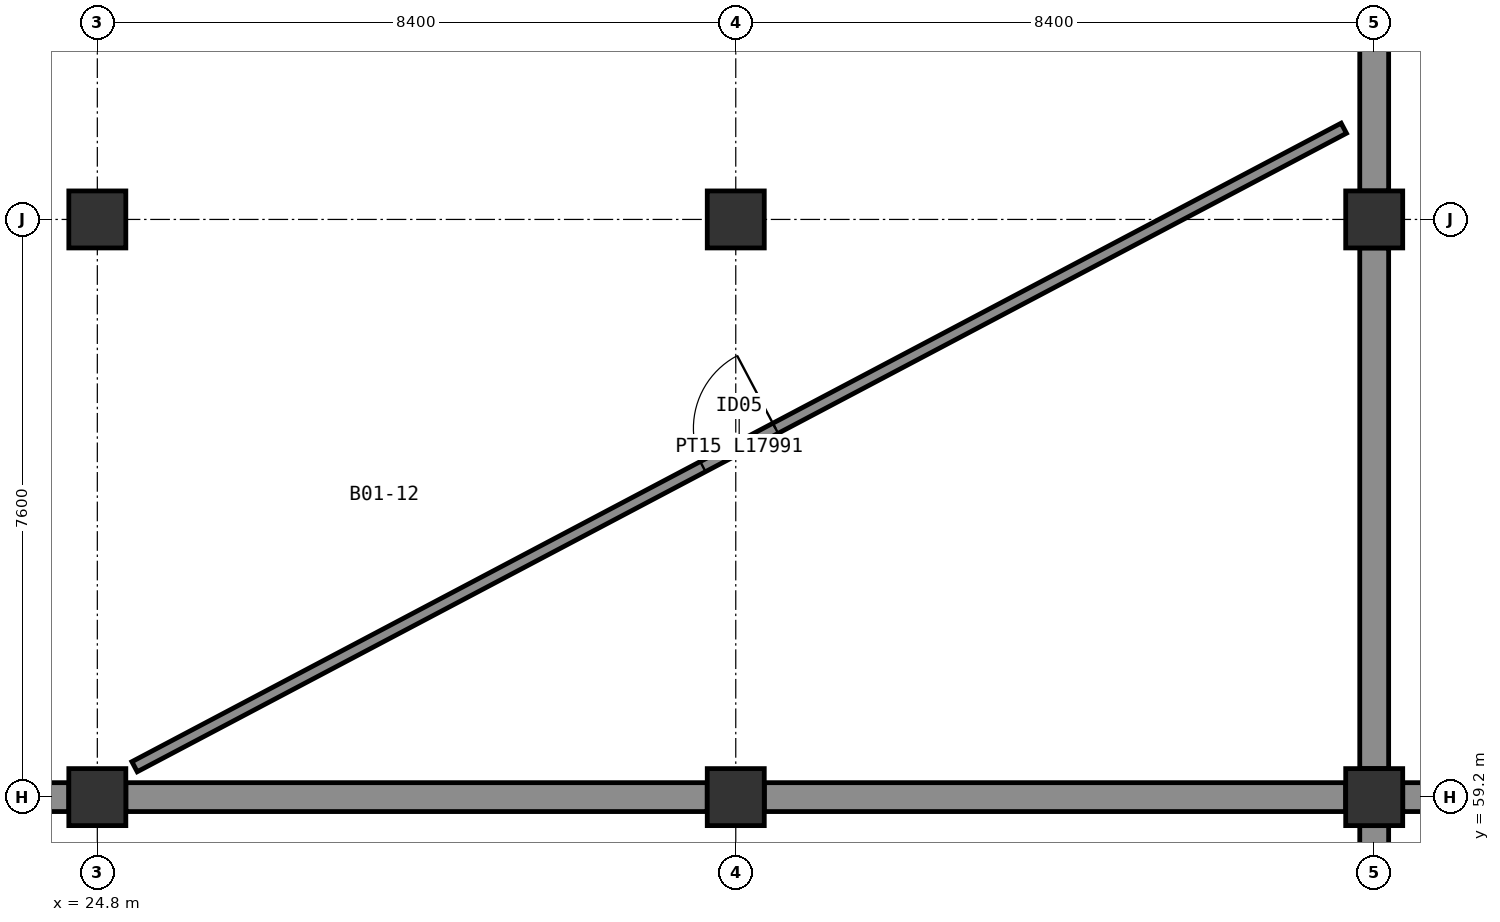
"""IFC4 building model, lengths in metres.
Left out: names, types, materials, properties, quantities, classifications, styles, units other than length and angle.
Written with IfcOpenShell. Run it as: python <this file> out.ifc"""

import sys

from ifc_helpers import new_model, si_unit, direction, frame, frame_2d, origin, origin_2d, place, context, subcontext, project, spatial, rectangle, extrude, element, fill, save


model = new_model("IFC4")
c1 = context("Model", 3, precision=1e-05, world=origin(), true_north=direction((0.0, 1.0)))
c2 = subcontext(c1, "Body", "Model", "MODEL_VIEW")
j1 = project(units=[si_unit("LENGTHUNIT", "METRE"), si_unit("PLANEANGLEUNIT", "RADIAN")], contexts=[c1])
p1 = place(None, origin())
s1 = spatial("IfcSite", under=j1, at=p1, CompositionType="ELEMENT")
p2 = place(p1, origin())
s2 = spatial("IfcBuilding", under=s1, at=p2, CompositionType="ELEMENT")
p3 = place(p2, frame((0.0, 0.0, -4.5)))
s3 = spatial("IfcBuildingStorey", under=s2, at=p3, CompositionType="ELEMENT", Elevation=-4.5)
for number, where, z_axis, x_axis in (
    (1, (24.8, 59.2, -0.4), (0.0, 0.0, 1.0), (1.0, 0.0, 0.0)),
    (2, (33.2, 59.2, -0.4), (0.0, 0.0, 1.0), (1.0, 0.0, 0.0)),
    (3, (41.6, 59.2, -0.4), (0.0, 0.0, 1.0), (1.0, 0.0, 0.0)),
    (4, (24.8, 66.8, -0.4), (0.0, 0.0, 1.0), (1.0, 0.0, 0.0)),
    (5, (33.2, 66.8, -0.4), (0.0, 0.0, 1.0), (1.0, 0.0, 0.0)),
    (6, (41.6, 66.8, -0.4), (0.0, 0.0, 1.0), (1.0, 0.0, 0.0)),
):
    element("IfcColumn", number, at=place(p3, frame(where, z_axis=z_axis, x_axis=x_axis)), inside=s3, PredefinedType="COLUMN", context=c2, shape_type="SweptSolid", body=[
        extrude(rectangle(XDim=0.75, YDim=0.75, at=origin_2d()), origin(), (0.0, 0.0, 1.0), 4.9),
    ])
p4 = place(p3, frame((49.625, 59.2, 0.0), z_axis=(0.0, 0.0, 1.0), x_axis=(-1.0, 0.0, 0.0)))
e7 = element("IfcWall", 7, at=p4, inside=s3, PredefinedType="SOLIDWALL", context=c2, shape_type="SweptSolid", body=[
    extrude(rectangle(XDim=7.65, YDim=0.38, at=frame_2d((3.825, 0.0))), origin(), (0.0, 0.0, 1.0), 3.847),
])
p5 = place(p3, frame((41.6, 59.575, 0.0), z_axis=(0.0, 0.0, 1.0), x_axis=(0.0, 1.0, 0.0)))
e8 = element("IfcWall", 8, at=p5, inside=s3, PredefinedType="SOLIDWALL", context=c2, shape_type="SweptSolid", body=[
    extrude(rectangle(XDim=6.85, YDim=0.38, at=frame_2d((3.425, 0.0))), origin(), (0.0, 0.0, 1.0), 3.61),
])
p6 = place(p3, frame((41.6, 67.175, 0.0), z_axis=(0.0, 0.0, 1.0), x_axis=(0.0, 1.0, 0.0)))
e9 = element("IfcWall", 9, at=p6, inside=s3, PredefinedType="SOLIDWALL", context=c2, shape_type="SweptSolid", body=[
    extrude(rectangle(XDim=6.85, YDim=0.38, at=frame_2d((3.425, 0.0))), origin(), (0.0, 0.0, 1.0), 3.61),
])
p7 = place(p3, frame((16.775, 59.2, 0.0), z_axis=(0.0, 0.0, 1.0), x_axis=(1.0, 0.0, 0.0)))
e10 = element("IfcWall", 10, at=p7, inside=s3, PredefinedType="SOLIDWALL", context=c2, shape_type="SweptSolid", body=[
    extrude(rectangle(XDim=7.65, YDim=0.38, at=frame_2d((3.825, 0.0))), origin(), (0.0, 0.0, 1.0), 3.847),
])
p8 = place(p3, frame((25.175, 59.2, 0.0), z_axis=(0.0, 0.0, 1.0), x_axis=(1.0, 0.0, 0.0)))
e11 = element("IfcWall", 11, at=p8, inside=s3, PredefinedType="SOLIDWALL", context=c2, shape_type="SweptSolid", body=[
    extrude(rectangle(XDim=7.65, YDim=0.38, at=frame_2d((3.825, 0.0))), origin(), (0.0, 0.0, 1.0), 3.847),
])
p9 = place(p3, frame((33.575, 59.2, 0.0), z_axis=(0.0, 0.0, 1.0), x_axis=(1.0, 0.0, 0.0)))
e12 = element("IfcWall", 12, at=p9, inside=s3, PredefinedType="SOLIDWALL", context=c2, shape_type="SweptSolid", body=[
    extrude(rectangle(XDim=7.65, YDim=0.38, at=frame_2d((3.825, 0.0))), origin(), (0.0, 0.0, 1.0), 3.61),
])
p10 = place(p3, frame((41.6, 58.825, 0.0), z_axis=(0.0, 0.0, 1.0), x_axis=(0.0, -1.0, 0.0)))
e13 = element("IfcWall", 13, at=p10, inside=s3, PredefinedType="SOLIDWALL", context=c2, shape_type="SweptSolid", body=[
    extrude(rectangle(XDim=6.85, YDim=0.38, at=frame_2d((3.425, 0.0))), origin(), (0.0, 0.0, 1.0), 3.51),
])
p11 = place(p3, frame((25.29, 59.6, 0.0), z_axis=(0.0, 0.0, 1.0), x_axis=(0.884315812219, 0.466889220544, 0.0)))
e14 = element("IfcWall", 14, at=p11, inside=s3, PredefinedType="PARTITIONING", context=c2, shape_type="SweptSolid", body=[
    extrude(rectangle(XDim=17.991, YDim=0.15, at=frame_2d((8.996, 0.0))), origin(), (0.0, 0.0, 1.0), 4.16),
])
p12 = place(p11, frame((8.456, 0.0, 0.0)))
e15 = element("IfcOpeningElement", 15, at=p12, cuts=e14, PredefinedType="OPENING", context=c2, shape_type="SweptSolid", body=[
    extrude(rectangle(XDim=1.08, YDim=2.12, at=frame_2d((0.54, 1.06))), frame((0.0, 0.085, 0.0), z_axis=(0.0, -1.0, 0.0), x_axis=(1.0, 0.0, 0.0)), (0.0, 0.0, 1.0), 0.17),
])
p13 = place(p12, origin())
e16 = element("IfcDoor", 16, at=p13, inside=s3, OperationType="SINGLE_SWING_RIGHT", PredefinedType="DOOR", context=c2, shape_type="SweptSolid", body=[
    extrude(rectangle(XDim=1.08, YDim=2.12, at=frame_2d((0.54, 1.06))), frame((0.0, 0.025, 0.0), z_axis=(0.0, -1.0, 0.0), x_axis=(1.0, 0.0, 0.0)), (0.0, 0.0, 1.0), 0.05),
])
fill(e15, e16)
save(model, sys.argv[1])
